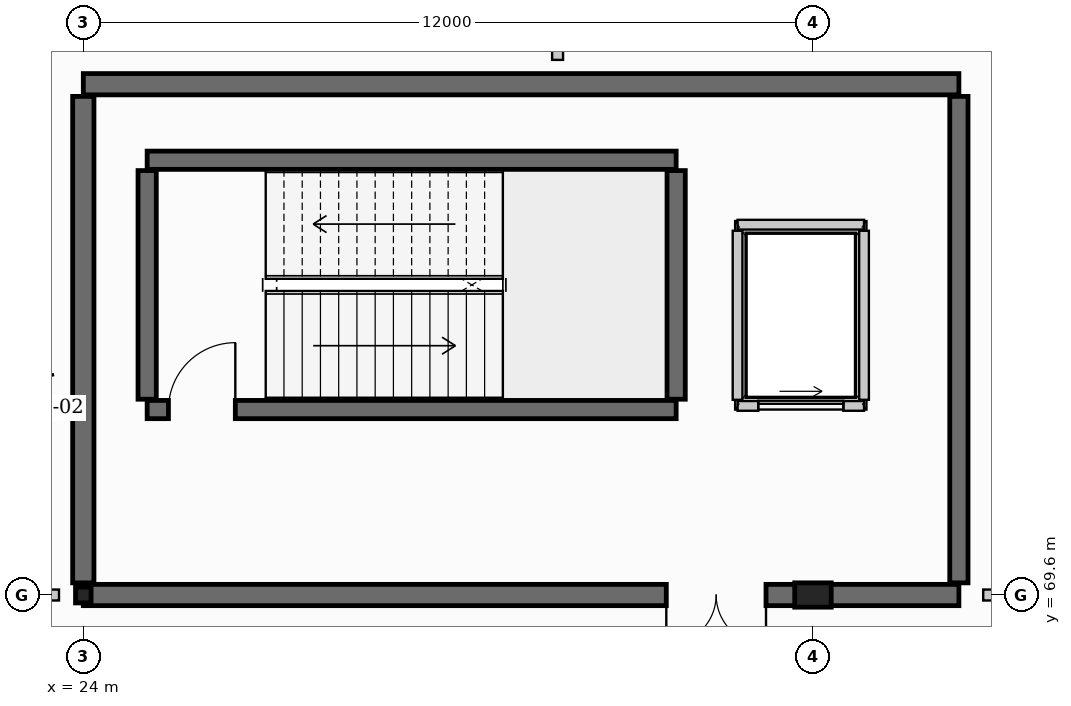
"""IFC4 building model, lengths in metres.
Left out: names, types, materials, properties, quantities, classifications, styles, units other than length and angle.
Written with IfcOpenShell. Run it as: python <this file> out.ifc"""

import sys

from ifc_helpers import new_model, si_unit, direction, frame, frame_2d, origin, origin_2d, place, context, subcontext, project, spatial, rectangle, i_section, extrude, element, fill, save


model = new_model("IFC4")
c1 = context("Model", 3, precision=1e-05, world=origin(), true_north=direction((0.0, 1.0)))
c2 = subcontext(c1, "Body", "Model", "MODEL_VIEW")
j1 = project(units=[si_unit("LENGTHUNIT", "METRE"), si_unit("PLANEANGLEUNIT", "RADIAN")], contexts=[c1])
p1 = place(None, origin())
s1 = spatial("IfcSite", under=j1, at=p1, CompositionType="ELEMENT")
p2 = place(p1, origin())
s2 = spatial("IfcBuilding", under=s1, at=p2, CompositionType="ELEMENT")
p3 = place(p2, origin())
s3 = spatial("IfcBuildingStorey", under=s2, at=p3, CompositionType="ELEMENT", Elevation=0.0)
p4 = place(p3, frame((24.0, 69.6, 0.0), z_axis=(0.0, 0.0, 1.0), x_axis=(1.0, 0.0, 0.0)))
e1 = element("IfcColumn", 1, at=p4, inside=s3, PredefinedType="COLUMN", context=c2, shape_type="SweptSolid", body=[
    extrude(i_section(OverallWidth=0.256, OverallDepth=0.26, WebThickness=0.01, FlangeThickness=0.017, at=origin_2d()), origin(), (0.0, 0.0, 1.0), 4.8),
])
p5 = place(p3, frame((36.0, 69.6, 0.0), z_axis=(0.0, 0.0, 1.0), x_axis=(0.0, 1.0, 0.0)))
e2 = element("IfcColumn", 2, at=p5, inside=s3, PredefinedType="PILASTER", context=c2, shape_type="SweptSolid", body=[
    extrude(rectangle(XDim=0.4, YDim=0.6, at=origin_2d()), origin(), (0.0, 0.0, 1.0), 4.8),
])
p6 = place(p3, frame((24.0, 78.0, 0.0), z_axis=(0.0, 0.0, 1.0), x_axis=(1.0, 0.0, 0.0)))
e3 = element("IfcWall", 3, at=p6, inside=s3, PredefinedType="SHEAR", context=c2, shape_type="SweptSolid", body=[
    extrude(rectangle(XDim=14.4, YDim=0.35, at=frame_2d((7.2, 0.0))), origin(), (0.0, 0.0, 1.0), 4.8),
])
p7 = place(p3, frame((38.4, 69.6, 0.0), z_axis=(0.0, 0.0, 1.0), x_axis=(-1.0, 0.0, 0.0)))
e4 = element("IfcWall", 4, at=p7, inside=s3, PredefinedType="SHEAR", context=c2, shape_type="SweptSolid", body=[
    extrude(rectangle(XDim=14.4, YDim=0.35, at=frame_2d((7.2, 0.0))), origin(), (0.0, 0.0, 1.0), 4.8),
])
p8 = place(p7, frame((3.172, 0.0, 0.0)))
e5 = element("IfcOpeningElement", 5, at=p8, cuts=e4, PredefinedType="OPENING", context=c2, shape_type="SweptSolid", body=[
    extrude(rectangle(XDim=1.64, YDim=2.2, at=frame_2d((0.82, 1.1))), frame((0.0, 0.185, 0.0), z_axis=(0.0, -1.0, 0.0), x_axis=(1.0, 0.0, 0.0)), (0.0, 0.0, 1.0), 0.37),
])
p9 = place(p3, frame((24.0, 69.8, 0.0), z_axis=(0.0, 0.0, 1.0), x_axis=(0.0, 1.0, 0.0)))
e6 = element("IfcWall", 6, at=p9, inside=s3, PredefinedType="SHEAR", context=c2, shape_type="SweptSolid", body=[
    extrude(rectangle(XDim=8.0, YDim=0.35, at=frame_2d((4.0, 0.0))), origin(), (0.0, 0.0, 1.0), 4.8),
])
p10 = place(p3, frame((38.4, 77.8, 0.0), z_axis=(0.0, 0.0, 1.0), x_axis=(0.0, -1.0, 0.0)))
e7 = element("IfcWall", 7, at=p10, inside=s3, PredefinedType="SHEAR", context=c2, shape_type="SweptSolid", body=[
    extrude(rectangle(XDim=8.0, YDim=0.3, at=frame_2d((4.0, 0.0))), origin(), (0.0, 0.0, 1.0), 4.8),
])
p11 = place(p3, frame((25.05, 72.65, 0.0), z_axis=(0.0, 0.0, 1.0), x_axis=(1.0, 0.0, 0.0)))
e8 = element("IfcWall", 8, at=p11, inside=s3, PredefinedType="SHEAR", context=c2, shape_type="SweptSolid", body=[
    extrude(rectangle(XDim=8.7, YDim=0.3, at=frame_2d((4.35, 0.0))), origin(), (0.0, 0.0, 1.0), 4.8),
])
p12 = place(p11, frame((0.35, 0.0, 0.0)))
e9 = element("IfcOpeningElement", 9, at=p12, cuts=e8, PredefinedType="OPENING", context=c2, shape_type="SweptSolid", body=[
    extrude(rectangle(XDim=1.1, YDim=2.15, at=frame_2d((0.55, 1.075))), frame((0.0, 0.16, 0.0), z_axis=(0.0, -1.0, 0.0), x_axis=(1.0, 0.0, 0.0)), (0.0, 0.0, 1.0), 0.32),
])
p13 = place(p3, frame((33.75, 76.75, 0.0), z_axis=(0.0, 0.0, 1.0), x_axis=(-1.0, 0.0, 0.0)))
e10 = element("IfcWall", 10, at=p13, inside=s3, PredefinedType="SHEAR", context=c2, shape_type="SweptSolid", body=[
    extrude(rectangle(XDim=8.7, YDim=0.3, at=frame_2d((4.35, 0.0))), origin(), (0.0, 0.0, 1.0), 4.8),
])
for number, where, z_axis, x_axis in (
    (11, (25.05, 72.82, 0.0), (0.0, 0.0, 1.0), (0.0, 1.0, 0.0)),
    (12, (33.75, 72.82, 0.0), (0.0, 0.0, 1.0), (0.0, 1.0, 0.0)),
):
    element("IfcWall", number, at=place(p3, frame(where, z_axis=z_axis, x_axis=x_axis)), inside=s3, PredefinedType="SHEAR", context=c2, shape_type="SweptSolid", body=[
        extrude(rectangle(XDim=3.76, YDim=0.3, at=frame_2d((1.88, 0.0))), origin(), (0.0, 0.0, 1.0), 4.8),
    ])
p14 = place(p3, frame((34.76, 72.71, 0.0), z_axis=(0.0, 0.0, 1.0), x_axis=(1.0, 0.0, 0.0)))
e13 = element("IfcWall", 13, at=p14, inside=s3, PredefinedType="PARTITIONING", context=c2, shape_type="SweptSolid", body=[
    extrude(rectangle(XDim=2.08, YDim=0.16, at=frame_2d((1.04, 0.0))), origin(), (0.0, 0.0, 1.0), 4.445),
])
p15 = place(p14, frame((0.34, 0.0, 0.0)))
e14 = element("IfcOpeningElement", 14, at=p15, cuts=e13, PredefinedType="OPENING", context=c2, shape_type="SweptSolid", body=[
    extrude(rectangle(XDim=1.4, YDim=2.2, at=frame_2d((0.7, 1.1))), frame((0.0, 0.09, 0.0), z_axis=(0.0, -1.0, 0.0), x_axis=(1.0, 0.0, 0.0)), (0.0, 0.0, 1.0), 0.18),
])
p16 = place(p3, frame((36.84, 75.69, 0.0), z_axis=(0.0, 0.0, 1.0), x_axis=(-1.0, 0.0, 0.0)))
e15 = element("IfcWall", 15, at=p16, inside=s3, PredefinedType="PARTITIONING", context=c2, shape_type="SweptSolid", body=[
    extrude(rectangle(XDim=2.08, YDim=0.16, at=frame_2d((1.04, 0.0))), origin(), (0.0, 0.0, 1.0), 4.445),
])
for number, where, z_axis, x_axis in (
    (16, (34.76, 75.59, 0.0), (0.0, 0.0, 1.0), (0.0, -1.0, 0.0)),
    (17, (36.84, 72.81, 0.0), (0.0, 0.0, 1.0), (0.0, 1.0, 0.0)),
):
    element("IfcWall", number, at=place(p3, frame(where, z_axis=z_axis, x_axis=x_axis)), inside=s3, PredefinedType="PARTITIONING", context=c2, shape_type="SweptSolid", body=[
        extrude(rectangle(XDim=2.78, YDim=0.16, at=frame_2d((1.39, 0.0))), origin(), (0.0, 0.0, 1.0), 4.445),
    ])
p17 = place(p3, frame((20.3, 69.6, 0.0), z_axis=(0.0, 0.0, 1.0), x_axis=(1.0, 0.0, 0.0)))
e18 = element("IfcWall", 18, at=p17, inside=s3, PredefinedType="PARTITIONING", context=c2, shape_type="SweptSolid", body=[
    extrude(rectangle(XDim=3.3, YDim=0.18, at=frame_2d((1.65, 0.0))), origin(), (0.0, 0.0, 1.0), 3.97),
])
p18 = place(p17, frame((1.0, 0.0, 0.0)))
e19 = element("IfcOpeningElement", 19, at=p18, cuts=e18, PredefinedType="OPENING", context=c2, shape_type="SweptSolid", body=[
    extrude(rectangle(XDim=1.62, YDim=2.3, at=frame_2d((0.81, 1.15))), frame((0.0, 0.1, 0.0), z_axis=(0.0, -1.0, 0.0), x_axis=(1.0, 0.0, 0.0)), (0.0, 0.0, 1.0), 0.2),
])
p19 = place(p3, frame((31.8, 78.4, 0.0), z_axis=(0.0, 0.0, 1.0), x_axis=(0.0, 1.0, 0.0)))
e20 = element("IfcWall", 20, at=p19, inside=s3, PredefinedType="PARTITIONING", context=c2, shape_type="SweptSolid", body=[
    extrude(rectangle(XDim=2.8, YDim=0.18, at=frame_2d((1.4, 0.0))), origin(), (0.0, 0.0, 1.0), 4.445),
])
p20 = place(p3, frame((38.8, 69.6, 0.0), z_axis=(0.0, 0.0, 1.0), x_axis=(1.0, 0.0, 0.0)))
e21 = element("IfcWall", 21, at=p20, inside=s3, PredefinedType="PARTITIONING", context=c2, shape_type="SweptSolid", body=[
    extrude(rectangle(XDim=10.5, YDim=0.18, at=frame_2d((5.25, 0.0))), origin(), (0.0, 0.0, 1.0), 3.48),
])
p21 = place(p20, frame((4.6, 0.0, 0.0)))
e22 = element("IfcOpeningElement", 22, at=p21, cuts=e21, PredefinedType="OPENING", context=c2, shape_type="SweptSolid", body=[
    extrude(rectangle(XDim=1.62, YDim=2.3, at=frame_2d((0.81, 1.15))), frame((0.0, 0.1, 0.0), z_axis=(0.0, -1.0, 0.0), x_axis=(1.0, 0.0, 0.0)), (0.0, 0.0, 1.0), 0.2),
])
p22 = place(p15, origin())
e23 = element("IfcDoor", 23, at=p22, inside=s3, OperationType="SLIDING_TO_RIGHT", PredefinedType="DOOR", context=c2, shape_type="SweptSolid", body=[
    extrude(rectangle(XDim=1.4, YDim=2.2, at=frame_2d((0.7, 1.1))), frame((0.0, 0.025, 0.0), z_axis=(0.0, -1.0, 0.0), x_axis=(1.0, 0.0, 0.0)), (0.0, 0.0, 1.0), 0.05),
])
fill(e14, e23)
p23 = place(p12, origin())
e24 = element("IfcDoor", 24, at=p23, inside=s3, OperationType="SINGLE_SWING_RIGHT", PredefinedType="DOOR", context=c2, shape_type="SweptSolid", body=[
    extrude(rectangle(XDim=1.1, YDim=2.15, at=frame_2d((0.55, 1.075))), frame((0.0, 0.025, 0.0), z_axis=(0.0, -1.0, 0.0), x_axis=(1.0, 0.0, 0.0)), (0.0, 0.0, 1.0), 0.05),
])
fill(e9, e24)
p24 = place(p8, origin())
e25 = element("IfcDoor", 25, at=p24, inside=s3, OperationType="DOUBLE_DOOR_SINGLE_SWING", PredefinedType="DOOR", context=c2, shape_type="SweptSolid", body=[
    extrude(rectangle(XDim=1.64, YDim=2.2, at=frame_2d((0.82, 1.1))), frame((0.0, 0.025, 0.0), z_axis=(0.0, -1.0, 0.0), x_axis=(1.0, 0.0, 0.0)), (0.0, 0.0, 1.0), 0.05),
])
fill(e5, e25)
save(model, sys.argv[1])
